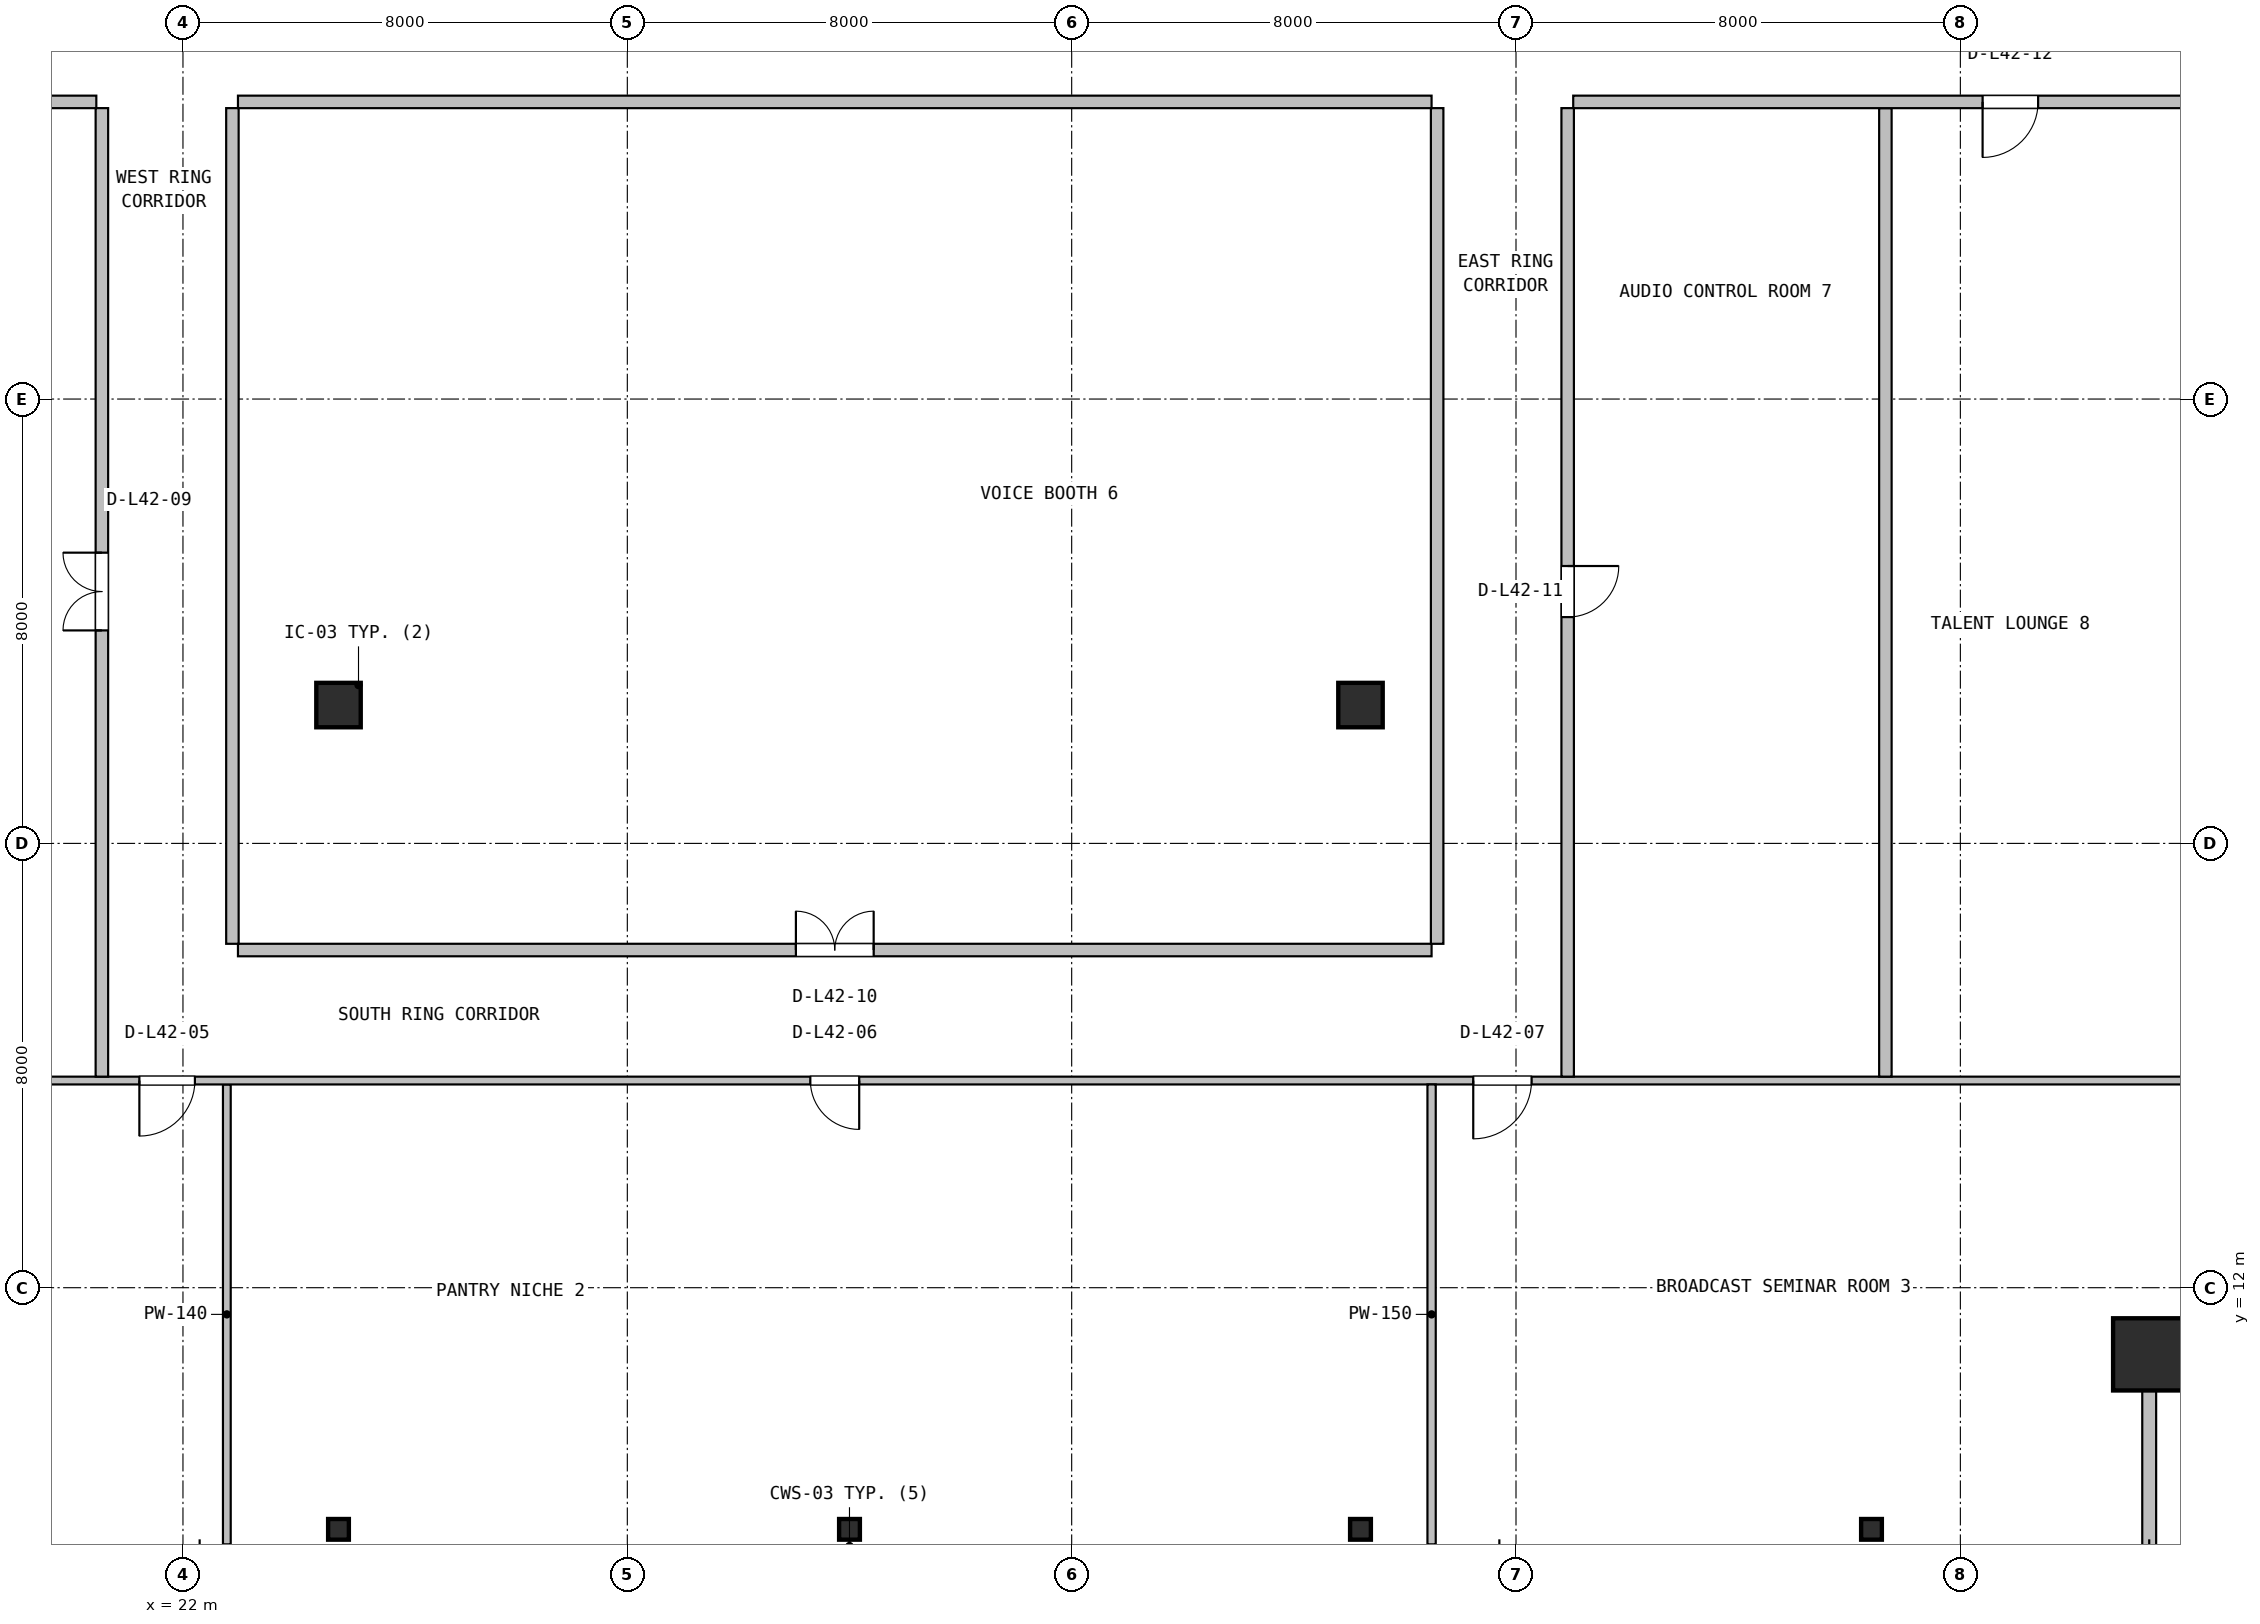
"""IFC4 building model, lengths in metres.
Left out: names, types, materials, properties, quantities, classifications, styles, units other than length and angle.
Written with IfcOpenShell. Run it as: python <this file> out.ifc"""

import sys

from ifc_helpers import new_model, si_unit, direction, frame, frame_2d, origin, origin_2d, place, context, subcontext, project, spatial, rectangle, hollow_rectangle, i_section, extrude, source, transform, mapped, element, fill, save


model = new_model("IFC4")
c1 = context("Model", 3, precision=1e-05, world=origin(), true_north=direction((0.0, 1.0)))
c2 = subcontext(c1, "Body", "Model", "MODEL_VIEW")
j1 = project(units=[si_unit("LENGTHUNIT", "METRE"), si_unit("PLANEANGLEUNIT", "RADIAN")], contexts=[c1])
p1 = place(None, origin())
s1 = spatial("IfcSite", under=j1, at=p1, CompositionType="ELEMENT")
p2 = place(p1, origin())
s2 = spatial("IfcBuilding", under=s1, at=p2, CompositionType="ELEMENT")
p3 = place(p2, frame((0.0, 0.0, 172.4)))
s3 = spatial("IfcBuildingStorey", under=s2, at=p3, CompositionType="ELEMENT", Elevation=172.4)
m1 = source(origin(), c2, "Body", "SweptSolid", [
    extrude(hollow_rectangle(XDim=1.3, YDim=1.3, WallThickness=0.05, at=origin_2d()), origin(), (0.0, 0.0, 1.0), 3.8),
])
p4 = place(p3, frame((57.4, 10.8, 0.0), z_axis=(0.0, 0.0, 1.0), x_axis=(1.0, 0.0, 0.0)))
e1 = element("IfcColumn", 1, at=p4, inside=s3, PredefinedType="COLUMN", context=c2, shape_type="MappedRepresentation", body=[
    mapped(m1, transform((0.0, 0.0, 0.0), x_axis=(1.0, 0.0, 0.0), y_axis=(0.0, 1.0, 0.0), z_axis=(0.0, 0.0, 1.0), scale=1.0)),
])
m2 = source(origin(), c2, "Body", "SweptSolid", [
    extrude(i_section(OverallWidth=0.374, OverallDepth=0.372, WebThickness=0.016, FlangeThickness=0.026, FilletRadius=0.016, at=origin_2d()), origin(), (0.0, 0.0, 1.0), 3.8),
])
for number, where, z_axis, x_axis in (
    (2, (24.8, 7.65, 0.0), (0.0, 0.0, 1.0), (1.0, 0.0, 0.0)),
    (3, (34.0, 7.65, 0.0), (0.0, 0.0, 1.0), (1.0, 0.0, 0.0)),
    (4, (43.2, 7.65, 0.0), (0.0, 0.0, 1.0), (1.0, 0.0, 0.0)),
    (5, (52.4, 7.65, 0.0), (0.0, 0.0, 1.0), (1.0, 0.0, 0.0)),
):
    element("IfcColumn", number, at=place(p3, frame(where, z_axis=z_axis, x_axis=x_axis)), inside=s3, PredefinedType="COLUMN", context=c2, shape_type="MappedRepresentation", body=[
        mapped(m2, transform((0.0, 0.0, 0.0), x_axis=(1.0, 0.0, 0.0), y_axis=(0.0, 1.0, 0.0), z_axis=(0.0, 0.0, 1.0), scale=1.0)),
    ])
m3 = source(origin(), c2, "Body", "SweptSolid", [
    extrude(rectangle(XDim=0.8, YDim=0.8, at=origin_2d()), origin(), (0.0, 0.0, 1.0), 3.8),
])
for number, where, z_axis, x_axis in (
    (6, (24.8, 22.49, 0.0), (0.0, 0.0, 1.0), (1.0, 0.0, 0.0)),
    (7, (43.2, 22.49, 0.0), (0.0, 0.0, 1.0), (1.0, 0.0, 0.0)),
):
    element("IfcColumn", number, at=place(p3, frame(where, z_axis=z_axis, x_axis=x_axis)), inside=s3, PredefinedType="COLUMN", context=c2, shape_type="MappedRepresentation", body=[
        mapped(m3, transform((0.0, 0.0, 0.0), x_axis=(1.0, 0.0, 0.0), y_axis=(0.0, 1.0, 0.0), z_axis=(0.0, 0.0, 1.0), scale=1.0)),
    ])
p5 = place(p3, frame((57.4, 7.28, 0.0), z_axis=(0.0, 0.0, 1.0), x_axis=(0.0, 1.0, 0.0)))
e8 = element("IfcWall", 8, at=p5, inside=s3, PredefinedType="SOLIDWALL", context=c2, shape_type="SweptSolid", body=[
    extrude(rectangle(XDim=3.6, YDim=0.25, at=frame_2d((1.8, 0.0))), origin(), (0.0, 0.0, 1.0), 3.108),
])
p6 = place(p3, frame((22.79, 7.38, 0.0), z_axis=(0.0, 0.0, 1.0), x_axis=(0.0, 1.0, 0.0)))
e9 = element("IfcWall", 9, at=p6, inside=s3, PredefinedType="PARTITIONING", context=c2, shape_type="SweptSolid", body=[
    extrude(rectangle(XDim=8.28, YDim=0.14, at=frame_2d((4.14, 0.0))), origin(), (0.0, 0.0, 1.0), 3.108),
])
p7 = place(p3, frame((7.18, 15.73, 0.0), z_axis=(0.0, 0.0, 1.0), x_axis=(1.0, 0.0, 0.0)))
e10 = element("IfcWall", 10, at=p7, inside=s3, PredefinedType="PARTITIONING", context=c2, shape_type="SweptSolid", body=[
    extrude(rectangle(XDim=53.64, YDim=0.14, at=frame_2d((26.82, 0.0))), origin(), (0.0, 0.0, 1.0), 2.909),
])
p8 = place(p7, frame((14.035, 0.0, 0.0)))
e11 = element("IfcOpeningElement", 11, at=p8, cuts=e10, PredefinedType="OPENING", context=c2, shape_type="SweptSolid", body=[
    extrude(rectangle(XDim=1.0, YDim=2.1, at=frame_2d((0.5, 1.05))), frame((0.0, 0.08, 0.0), z_axis=(0.0, -1.0, 0.0), x_axis=(1.0, 0.0, 0.0)), (0.0, 0.0, 1.0), 0.16),
])
p9 = place(p7, frame((26.115, 0.0, 0.0)))
e12 = element("IfcOpeningElement", 12, at=p9, cuts=e10, PredefinedType="OPENING", context=c2, shape_type="SweptSolid", body=[
    extrude(rectangle(XDim=0.88, YDim=2.06, at=frame_2d((0.44, 1.03))), frame((0.0, 0.08, 0.0), z_axis=(0.0, -1.0, 0.0), x_axis=(1.0, 0.0, 0.0)), (0.0, 0.0, 1.0), 0.16),
])
p10 = place(p7, frame((38.05, 0.0, 0.0)))
e13 = element("IfcOpeningElement", 13, at=p10, cuts=e10, PredefinedType="OPENING", context=c2, shape_type="SweptSolid", body=[
    extrude(rectangle(XDim=1.05, YDim=2.1, at=frame_2d((0.525, 1.05))), frame((0.0, 0.08, 0.0), z_axis=(0.0, -1.0, 0.0), x_axis=(1.0, 0.0, 0.0)), (0.0, 0.0, 1.0), 0.16),
])
p11 = place(p3, frame((44.48, 7.38, 0.0), z_axis=(0.0, 0.0, 1.0), x_axis=(0.0, 1.0, 0.0)))
e14 = element("IfcWall", 14, at=p11, inside=s3, PredefinedType="PARTITIONING", context=c2, shape_type="SweptSolid", body=[
    extrude(rectangle(XDim=8.28, YDim=0.15, at=frame_2d((4.14, 0.0))), origin(), (0.0, 0.0, 1.0), 3.108),
])
p12 = place(p3, frame((7.18, 33.35, 0.0), z_axis=(0.0, 0.0, 1.0), x_axis=(1.0, 0.0, 0.0)))
e15 = element("IfcWall", 15, at=p12, inside=s3, PredefinedType="PARTITIONING", context=c2, shape_type="SweptSolid", body=[
    extrude(rectangle(XDim=13.26, YDim=0.225, at=frame_2d((6.63, 0.0))), origin(), (0.0, 0.0, 1.0), 3.108),
])
p13 = place(p12, frame((5.715, 0.0, 0.0)))
e16 = element("IfcOpeningElement", 16, at=p13, cuts=e15, PredefinedType="OPENING", context=c2, shape_type="SweptSolid", body=[
    extrude(rectangle(XDim=1.4, YDim=2.12, at=frame_2d((0.7, 1.06))), frame((0.0, 0.123, 0.0), z_axis=(0.0, -1.0, 0.0), x_axis=(1.0, 0.0, 0.0)), (0.0, 0.0, 1.0), 0.245),
])
p14 = place(p3, frame((20.54, 15.8, 0.0), z_axis=(0.0, 0.0, 1.0), x_axis=(0.0, 1.0, 0.0)))
e17 = element("IfcWall", 17, at=p14, inside=s3, PredefinedType="PARTITIONING", context=c2, shape_type="SweptSolid", body=[
    extrude(rectangle(XDim=17.438, YDim=0.225, at=frame_2d((8.719, 0.0))), origin(), (0.0, 0.0, 1.0), 3.222),
])
p15 = place(p14, frame((8.034, 0.0, 0.0)))
e18 = element("IfcOpeningElement", 18, at=p15, cuts=e17, PredefinedType="OPENING", context=c2, shape_type="SweptSolid", body=[
    extrude(rectangle(XDim=1.4, YDim=2.12, at=frame_2d((0.7, 1.06))), frame((0.0, 0.123, 0.0), z_axis=(0.0, -1.0, 0.0), x_axis=(1.0, 0.0, 0.0)), (0.0, 0.0, 1.0), 0.245),
])
p16 = place(p3, frame((22.99, 18.08, 0.0), z_axis=(0.0, 0.0, 1.0), x_axis=(1.0, 0.0, 0.0)))
e19 = element("IfcWall", 19, at=p16, inside=s3, PredefinedType="PARTITIONING", context=c2, shape_type="SweptSolid", body=[
    extrude(rectangle(XDim=21.49, YDim=0.225, at=frame_2d((10.745, 0.0))), origin(), (0.0, 0.0, 1.0), 2.909),
])
p17 = place(p16, frame((10.045, 0.0, 0.0)))
e20 = element("IfcOpeningElement", 20, at=p17, cuts=e19, PredefinedType="OPENING", context=c2, shape_type="SweptSolid", body=[
    extrude(rectangle(XDim=1.4, YDim=2.12, at=frame_2d((0.7, 1.06))), frame((0.0, 0.123, 0.0), z_axis=(0.0, -1.0, 0.0), x_axis=(1.0, 0.0, 0.0)), (0.0, 0.0, 1.0), 0.245),
])
p18 = place(p3, frame((44.58, 18.192, 0.0), z_axis=(0.0, 0.0, 1.0), x_axis=(0.0, 1.0, 0.0)))
e21 = element("IfcWall", 21, at=p18, inside=s3, PredefinedType="PARTITIONING", context=c2, shape_type="SweptSolid", body=[
    extrude(rectangle(XDim=15.046, YDim=0.225, at=frame_2d((7.523, 0.0))), origin(), (0.0, 0.0, 1.0), 3.222),
])
p19 = place(p3, frame((22.99, 33.35, 0.0), z_axis=(0.0, 0.0, 1.0), x_axis=(1.0, 0.0, 0.0)))
e22 = element("IfcWall", 22, at=p19, inside=s3, PredefinedType="PARTITIONING", context=c2, shape_type="SweptSolid", body=[
    extrude(rectangle(XDim=21.49, YDim=0.225, at=frame_2d((10.745, 0.0))), origin(), (0.0, 0.0, 1.0), 2.909),
])
p20 = place(p3, frame((22.89, 18.192, 0.0), z_axis=(0.0, 0.0, 1.0), x_axis=(0.0, 1.0, 0.0)))
e23 = element("IfcWall", 23, at=p20, inside=s3, PredefinedType="PARTITIONING", context=c2, shape_type="SweptSolid", body=[
    extrude(rectangle(XDim=15.046, YDim=0.225, at=frame_2d((7.523, 0.0))), origin(), (0.0, 0.0, 1.0), 3.222),
])
p21 = place(p3, frame((52.65, 15.8, 0.0), z_axis=(0.0, 0.0, 1.0), x_axis=(0.0, 1.0, 0.0)))
e24 = element("IfcWall", 24, at=p21, inside=s3, PredefinedType="PARTITIONING", context=c2, shape_type="SweptSolid", body=[
    extrude(rectangle(XDim=17.438, YDim=0.225, at=frame_2d((8.719, 0.0))), origin(), (0.0, 0.0, 1.0), 3.222),
])
p22 = place(p3, frame((47.03, 33.35, 0.0), z_axis=(0.0, 0.0, 1.0), x_axis=(1.0, 0.0, 0.0)))
e25 = element("IfcWall", 25, at=p22, inside=s3, PredefinedType="PARTITIONING", context=c2, shape_type="SweptSolid", body=[
    extrude(rectangle(XDim=13.79, YDim=0.225, at=frame_2d((6.895, 0.0))), origin(), (0.0, 0.0, 1.0), 3.108),
])
p23 = place(p22, frame((7.37, 0.0, 0.0)))
e26 = element("IfcOpeningElement", 26, at=p23, cuts=e25, PredefinedType="OPENING", context=c2, shape_type="SweptSolid", body=[
    extrude(rectangle(XDim=1.0, YDim=2.1, at=frame_2d((0.5, 1.05))), frame((0.0, 0.123, 0.0), z_axis=(0.0, -1.0, 0.0), x_axis=(1.0, 0.0, 0.0)), (0.0, 0.0, 1.0), 0.245),
])
p24 = place(p3, frame((46.93, 15.8, 0.0), z_axis=(0.0, 0.0, 1.0), x_axis=(0.0, 1.0, 0.0)))
e27 = element("IfcWall", 27, at=p24, inside=s3, PredefinedType="PARTITIONING", context=c2, shape_type="SweptSolid", body=[
    extrude(rectangle(XDim=17.438, YDim=0.225, at=frame_2d((8.719, 0.0))), origin(), (0.0, 0.0, 1.0), 3.222),
])
p25 = place(p24, frame((8.274, 0.0, 0.0)))
e28 = element("IfcOpeningElement", 28, at=p25, cuts=e27, PredefinedType="OPENING", context=c2, shape_type="SweptSolid", body=[
    extrude(rectangle(XDim=0.92, YDim=2.08, at=frame_2d((0.46, 1.04))), frame((0.0, 0.123, 0.0), z_axis=(0.0, -1.0, 0.0), x_axis=(1.0, 0.0, 0.0)), (0.0, 0.0, 1.0), 0.245),
])
m4 = source(origin(), c2, "Body", "SweptSolid", [
    extrude(rectangle(XDim=1.0, YDim=2.1, at=frame_2d((0.5, 1.05))), frame((0.0, 0.025, 0.0), z_axis=(0.0, -1.0, 0.0), x_axis=(1.0, 0.0, 0.0)), (0.0, 0.0, 1.0), 0.05),
])
p26 = place(p8, frame((1.0, 0.0, 0.0), z_axis=(0.0, 0.0, 1.0), x_axis=(-1.0, 0.0, 0.0)))
e29 = element("IfcDoor", 29, at=p26, inside=s3, OperationType="SINGLE_SWING_LEFT", PredefinedType="DOOR", context=c2, shape_type="MappedRepresentation", body=[
    mapped(m4, transform((0.0, 0.0, 0.0), x_axis=(1.0, 0.0, 0.0), y_axis=(0.0, 1.0, 0.0), z_axis=(0.0, 0.0, 1.0), scale=1.0)),
])
fill(e11, e29)
m5 = source(origin(), c2, "Body", "SweptSolid", [
    extrude(rectangle(XDim=0.88, YDim=2.06, at=frame_2d((0.44, 1.03))), frame((0.0, 0.025, 0.0), z_axis=(0.0, -1.0, 0.0), x_axis=(1.0, 0.0, 0.0)), (0.0, 0.0, 1.0), 0.05),
])
p27 = place(p9, frame((0.88, 0.0, 0.0), z_axis=(0.0, 0.0, 1.0), x_axis=(-1.0, 0.0, 0.0)))
e30 = element("IfcDoor", 30, at=p27, inside=s3, OperationType="SINGLE_SWING_RIGHT", PredefinedType="DOOR", context=c2, shape_type="MappedRepresentation", body=[
    mapped(m5, transform((0.0, 0.0, 0.0), x_axis=(1.0, 0.0, 0.0), y_axis=(0.0, 1.0, 0.0), z_axis=(0.0, 0.0, 1.0), scale=1.0)),
])
fill(e12, e30)
m6 = source(origin(), c2, "Body", "SweptSolid", [
    extrude(rectangle(XDim=1.05, YDim=2.1, at=frame_2d((0.525, 1.05))), frame((0.0, 0.025, 0.0), z_axis=(0.0, -1.0, 0.0), x_axis=(1.0, 0.0, 0.0)), (0.0, 0.0, 1.0), 0.05),
])
p28 = place(p10, frame((1.05, 0.0, 0.0), z_axis=(0.0, 0.0, 1.0), x_axis=(-1.0, 0.0, 0.0)))
e31 = element("IfcDoor", 31, at=p28, inside=s3, OperationType="SINGLE_SWING_LEFT", PredefinedType="DOOR", context=c2, shape_type="MappedRepresentation", body=[
    mapped(m6, transform((0.0, 0.0, 0.0), x_axis=(1.0, 0.0, 0.0), y_axis=(0.0, 1.0, 0.0), z_axis=(0.0, 0.0, 1.0), scale=1.0)),
])
fill(e13, e31)
m7 = source(origin(), c2, "Body", "SweptSolid", [
    extrude(rectangle(XDim=1.4, YDim=2.12, at=frame_2d((0.7, 1.06))), frame((0.0, 0.025, 0.0), z_axis=(0.0, -1.0, 0.0), x_axis=(1.0, 0.0, 0.0)), (0.0, 0.0, 1.0), 0.05),
])
p29 = place(p15, origin())
e32 = element("IfcDoor", 32, at=p29, inside=s3, OperationType="DOUBLE_DOOR_SINGLE_SWING", PredefinedType="DOOR", context=c2, shape_type="MappedRepresentation", body=[
    mapped(m7, transform((0.0, 0.0, 0.0), x_axis=(1.0, 0.0, 0.0), y_axis=(0.0, 1.0, 0.0), z_axis=(0.0, 0.0, 1.0), scale=1.0)),
])
fill(e18, e32)
p30 = place(p17, origin())
e33 = element("IfcDoor", 33, at=p30, inside=s3, OperationType="DOUBLE_DOOR_SINGLE_SWING", PredefinedType="DOOR", context=c2, shape_type="MappedRepresentation", body=[
    mapped(m7, transform((0.0, 0.0, 0.0), x_axis=(1.0, 0.0, 0.0), y_axis=(0.0, 1.0, 0.0), z_axis=(0.0, 0.0, 1.0), scale=1.0)),
])
fill(e20, e33)
m8 = source(origin(), c2, "Body", "SweptSolid", [
    extrude(rectangle(XDim=0.92, YDim=2.08, at=frame_2d((0.46, 1.04))), frame((0.0, 0.025, 0.0), z_axis=(0.0, -1.0, 0.0), x_axis=(1.0, 0.0, 0.0)), (0.0, 0.0, 1.0), 0.05),
])
p31 = place(p25, frame((0.92, 0.0, 0.0), z_axis=(0.0, 0.0, 1.0), x_axis=(-1.0, 0.0, 0.0)))
e34 = element("IfcDoor", 34, at=p31, inside=s3, OperationType="SINGLE_SWING_RIGHT", PredefinedType="DOOR", context=c2, shape_type="MappedRepresentation", body=[
    mapped(m8, transform((0.0, 0.0, 0.0), x_axis=(1.0, 0.0, 0.0), y_axis=(0.0, 1.0, 0.0), z_axis=(0.0, 0.0, 1.0), scale=1.0)),
])
fill(e28, e34)
p32 = place(p23, frame((1.0, 0.0, 0.0), z_axis=(0.0, 0.0, 1.0), x_axis=(-1.0, 0.0, 0.0)))
e35 = element("IfcDoor", 35, at=p32, inside=s3, OperationType="SINGLE_SWING_LEFT", PredefinedType="DOOR", context=c2, shape_type="MappedRepresentation", body=[
    mapped(m4, transform((0.0, 0.0, 0.0), x_axis=(1.0, 0.0, 0.0), y_axis=(0.0, 1.0, 0.0), z_axis=(0.0, 0.0, 1.0), scale=1.0)),
])
fill(e26, e35)
save(model, sys.argv[1])
